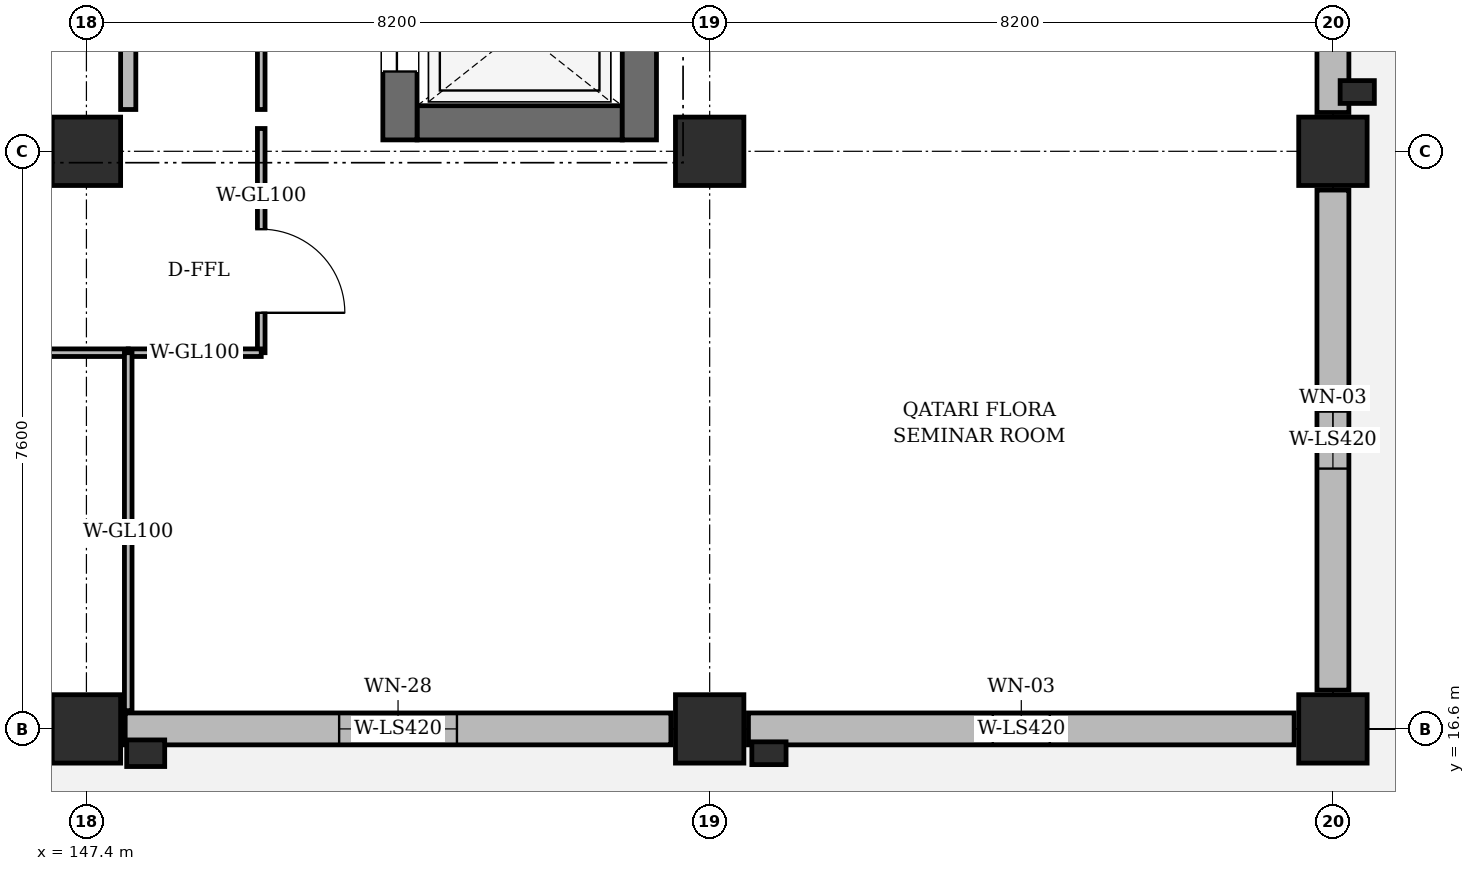
"""IFC4 building model, lengths in metres.
Left out: names, types, materials, properties, quantities, classifications, styles, units other than length and angle.
Written with IfcOpenShell. Run it as: python <this file> out.ifc"""

import sys

from ifc_helpers import new_model, si_unit, direction, frame, frame_2d, origin, origin_2d, place, context, subcontext, project, spatial, rectangle, extrude, element, fill, save


model = new_model("IFC4")
c1 = context("Model", 3, precision=1e-05, world=origin(), true_north=direction((0.0, 1.0)))
c2 = subcontext(c1, "Body", "Model", "MODEL_VIEW")
j1 = project(units=[si_unit("LENGTHUNIT", "METRE"), si_unit("PLANEANGLEUNIT", "RADIAN")], contexts=[c1])
p1 = place(None, origin())
s1 = spatial("IfcSite", under=j1, at=p1, CompositionType="ELEMENT")
p2 = place(p1, origin())
s2 = spatial("IfcBuilding", under=s1, at=p2, CompositionType="ELEMENT")
p3 = place(p2, frame((0.0, 0.0, 5.4)))
s3 = spatial("IfcBuildingStorey", under=s2, at=p3, CompositionType="ELEMENT", Elevation=5.4)
p4 = place(p3, frame((147.4, 16.6, 0.0), z_axis=(0.0, 0.0, 1.0), x_axis=(1.0, 0.0, 0.0)))
e1 = element("IfcColumn", 1, at=p4, inside=s3, PredefinedType="COLUMN", context=c2, shape_type="SweptSolid", body=[
    extrude(rectangle(XDim=0.9, YDim=0.9, at=origin_2d()), origin(), (0.0, 0.0, 1.0), 4.545),
])
p5 = place(p3, frame((147.4, 24.2, 0.0), z_axis=(0.0, 0.0, 1.0), x_axis=(1.0, 0.0, 0.0)))
e2 = element("IfcColumn", 2, at=p5, inside=s3, PredefinedType="COLUMN", context=c2, shape_type="SweptSolid", body=[
    extrude(rectangle(XDim=0.9, YDim=0.9, at=origin_2d()), origin(), (0.0, 0.0, 1.0), 4.52),
])
p6 = place(p3, frame((155.6, 16.6, 0.0), z_axis=(0.0, 0.0, 1.0), x_axis=(1.0, 0.0, 0.0)))
e3 = element("IfcColumn", 3, at=p6, inside=s3, PredefinedType="COLUMN", context=c2, shape_type="SweptSolid", body=[
    extrude(rectangle(XDim=0.9, YDim=0.9, at=origin_2d()), origin(), (0.0, 0.0, 1.0), 4.545),
])
p7 = place(p3, frame((155.6, 24.2, 0.0), z_axis=(0.0, 0.0, 1.0), x_axis=(1.0, 0.0, 0.0)))
e4 = element("IfcColumn", 4, at=p7, inside=s3, PredefinedType="COLUMN", context=c2, shape_type="SweptSolid", body=[
    extrude(rectangle(XDim=0.9, YDim=0.9, at=origin_2d()), origin(), (0.0, 0.0, 1.0), 4.52),
])
for number, where, z_axis, x_axis in (
    (5, (163.8, 16.6, 0.0), (0.0, 0.0, 1.0), (1.0, 0.0, 0.0)),
    (6, (163.8, 24.2, 0.0), (0.0, 0.0, 1.0), (1.0, 0.0, 0.0)),
):
    element("IfcColumn", number, at=place(p3, frame(where, z_axis=z_axis, x_axis=x_axis)), inside=s3, PredefinedType="COLUMN", context=c2, shape_type="SweptSolid", body=[
        extrude(rectangle(XDim=0.9, YDim=0.9, at=origin_2d()), origin(), (0.0, 0.0, 1.0), 4.545),
    ])
p8 = place(p3, frame((148.18, 16.28, 0.0), z_axis=(0.0, 0.0, 1.0), x_axis=(1.0, 0.0, 0.0)))
e7 = element("IfcColumn", 7, at=p8, inside=s3, PredefinedType="PILASTER", context=c2, shape_type="SweptSolid", body=[
    extrude(rectangle(XDim=0.5, YDim=0.35, at=origin_2d()), origin(), (0.0, 0.0, 1.0), 4.42),
])
for number, where, z_axis, x_axis in (
    (8, (156.38, 16.28, 0.0), (0.0, 0.0, 1.0), (1.0, 0.0, 0.0)),
    (9, (164.12, 24.98, 0.0), (0.0, 0.0, 1.0), (1.0, 0.0, 0.0)),
):
    element("IfcColumn", number, at=place(p3, frame(where, z_axis=z_axis, x_axis=x_axis)), inside=s3, PredefinedType="PILASTER", context=c2, shape_type="SweptSolid", body=[
        extrude(rectangle(XDim=0.45, YDim=0.3, at=origin_2d()), origin(), (0.0, 0.0, 1.0), 4.42),
    ])
p9 = place(p3, frame((147.91, 16.6, 0.0), z_axis=(0.0, 0.0, 1.0), x_axis=(1.0, 0.0, 0.0)))
e10 = element("IfcWall", 10, at=p9, inside=s3, PredefinedType="SOLIDWALL", context=c2, shape_type="SweptSolid", body=[
    extrude(rectangle(XDim=7.18, YDim=0.42, at=frame_2d((3.59, 0.0))), origin(), (0.0, 0.0, 1.0), 3.93),
])
p10 = place(p9, frame((2.815, 0.0, 0.95)))
e11 = element("IfcOpeningElement", 11, at=p10, cuts=e10, PredefinedType="OPENING", context=c2, shape_type="SweptSolid", body=[
    extrude(rectangle(XDim=1.55, YDim=2.05, at=frame_2d((0.775, 1.025))), frame((0.0, 0.222, 0.0), z_axis=(0.0, -1.0, 0.0), x_axis=(1.0, 0.0, 0.0)), (0.0, 0.0, 1.0), 0.444),
])
p11 = place(p3, frame((156.11, 16.6, 0.0), z_axis=(0.0, 0.0, 1.0), x_axis=(1.0, 0.0, 0.0)))
e12 = element("IfcWall", 12, at=p11, inside=s3, PredefinedType="SOLIDWALL", context=c2, shape_type="SweptSolid", body=[
    extrude(rectangle(XDim=7.18, YDim=0.42, at=frame_2d((3.59, 0.0))), origin(), (0.0, 0.0, 1.0), 3.93),
])
p12 = place(p11, frame((3.215, 0.0, 0.95)))
e13 = element("IfcOpeningElement", 13, at=p12, cuts=e12, PredefinedType="OPENING", context=c2, shape_type="SweptSolid", body=[
    extrude(rectangle(XDim=0.75, YDim=1.8, at=frame_2d((0.375, 0.9))), frame((0.0, 0.222, 0.0), z_axis=(0.0, -1.0, 0.0), x_axis=(1.0, 0.0, 0.0)), (0.0, 0.0, 1.0), 0.444),
])
p13 = place(p3, frame((163.8, 17.11, 0.0), z_axis=(0.0, 0.0, 1.0), x_axis=(0.0, 1.0, 0.0)))
e14 = element("IfcWall", 14, at=p13, inside=s3, PredefinedType="SOLIDWALL", context=c2, shape_type="SweptSolid", body=[
    extrude(rectangle(XDim=6.58, YDim=0.42, at=frame_2d((3.29, 0.0))), origin(), (0.0, 0.0, 1.0), 3.93),
])
p14 = place(p13, frame((2.915, 0.0, 0.95)))
e15 = element("IfcOpeningElement", 15, at=p14, cuts=e14, PredefinedType="OPENING", context=c2, shape_type="SweptSolid", body=[
    extrude(rectangle(XDim=0.75, YDim=1.8, at=frame_2d((0.375, 0.9))), frame((0.0, 0.222, 0.0), z_axis=(0.0, -1.0, 0.0), x_axis=(1.0, 0.0, 0.0)), (0.0, 0.0, 1.0), 0.444),
])
p15 = place(p3, frame((163.8, 24.71, 0.0), z_axis=(0.0, 0.0, 1.0), x_axis=(0.0, 1.0, 0.0)))
e16 = element("IfcWall", 16, at=p15, inside=s3, PredefinedType="SOLIDWALL", context=c2, shape_type="SweptSolid", body=[
    extrude(rectangle(XDim=6.58, YDim=0.42, at=frame_2d((3.29, 0.0))), origin(), (0.0, 0.0, 1.0), 3.93),
])
p16 = place(p15, frame((2.815, 0.0, 0.95)))
e17 = element("IfcOpeningElement", 17, at=p16, cuts=e16, PredefinedType="OPENING", context=c2, shape_type="SweptSolid", body=[
    extrude(rectangle(XDim=0.95, YDim=1.5, at=frame_2d((0.475, 0.75))), frame((0.0, 0.222, 0.0), z_axis=(0.0, -1.0, 0.0), x_axis=(1.0, 0.0, 0.0)), (0.0, 0.0, 1.0), 0.444),
])
p17 = place(p3, frame((151.75, 24.575, 0.0), z_axis=(0.0, 0.0, 1.0), x_axis=(1.0, 0.0, 0.0)))
e18 = element("IfcWall", 18, at=p17, inside=s3, PredefinedType="SHEAR", context=c2, shape_type="SweptSolid", body=[
    extrude(rectangle(XDim=2.7, YDim=0.45, at=frame_2d((1.35, 0.0))), origin(), (0.0, 0.0, 1.0), 4.52),
])
p18 = place(p3, frame((151.525, 24.35, 0.0), z_axis=(0.0, 0.0, 1.0), x_axis=(0.0, 1.0, 0.0)))
e19 = element("IfcWall", 19, at=p18, inside=s3, PredefinedType="SHEAR", context=c2, shape_type="SweptSolid", body=[
    extrude(rectangle(XDim=2.9, YDim=0.45, at=frame_2d((1.45, 0.0))), origin(), (0.0, 0.0, 1.0), 4.52),
])
p19 = place(p18, frame((0.9, 0.0, 0.0)))
e20 = element("IfcOpeningElement", 20, at=p19, cuts=e19, PredefinedType="OPENING", context=c2, shape_type="SweptSolid", body=[
    extrude(rectangle(XDim=1.1, YDim=2.2, at=frame_2d((0.55, 1.1))), frame((0.0, 0.237, 0.0), z_axis=(0.0, -1.0, 0.0), x_axis=(1.0, 0.0, 0.0)), (0.0, 0.0, 1.0), 0.474),
])
p20 = place(p3, frame((154.675, 24.35, 0.0), z_axis=(0.0, 0.0, 1.0), x_axis=(0.0, 1.0, 0.0)))
e21 = element("IfcWall", 21, at=p20, inside=s3, PredefinedType="SHEAR", context=c2, shape_type="SweptSolid", body=[
    extrude(rectangle(XDim=2.9, YDim=0.45, at=frame_2d((1.45, 0.0))), origin(), (0.0, 0.0, 1.0), 4.52),
])
p21 = place(p3, frame((147.95, 31.75, 0.0), z_axis=(0.0, 0.0, 1.0), x_axis=(0.0, -1.0, 0.0)))
e22 = element("IfcWall", 22, at=p21, inside=s3, PredefinedType="PARTITIONING", context=c2, shape_type="SweptSolid", body=[
    extrude(rectangle(XDim=7.0, YDim=0.2, at=frame_2d((3.5, 0.0))), origin(), (0.0, 0.0, 1.0), 4.405),
])
p22 = place(p21, frame((2.75, 0.0, 0.0)))
e23 = element("IfcOpeningElement", 23, at=p22, cuts=e22, PredefinedType="OPENING", context=c2, shape_type="SweptSolid", body=[
    extrude(rectangle(XDim=1.5, YDim=2.2, at=frame_2d((0.75, 1.1))), frame((0.0, 0.112, 0.0), z_axis=(0.0, -1.0, 0.0), x_axis=(1.0, 0.0, 0.0)), (0.0, 0.0, 1.0), 0.224),
])
p23 = place(p3, frame((149.7, 24.75, 0.0), z_axis=(0.0, 0.0, 1.0), x_axis=(0.0, 1.0, 0.0)))
e24 = element("IfcWall", 24, at=p23, inside=s3, PredefinedType="PARTITIONING", context=c2, shape_type="SweptSolid", body=[
    extrude(rectangle(XDim=11.3, YDim=0.1, at=frame_2d((5.65, 0.0))), origin(), (0.0, 0.0, 1.0), 4.405),
])
p24 = place(p23, frame((4.75, 0.0, 0.0)))
e25 = element("IfcOpeningElement", 25, at=p24, cuts=e24, PredefinedType="OPENING", context=c2, shape_type="SweptSolid", body=[
    extrude(rectangle(XDim=1.8, YDim=2.4, at=frame_2d((0.9, 1.2))), frame((0.0, 0.062, 0.0), z_axis=(0.0, -1.0, 0.0), x_axis=(1.0, 0.0, 0.0)), (0.0, 0.0, 1.0), 0.124),
])
p25 = place(p3, frame((147.95, 21.55, 0.0), z_axis=(0.0, 0.0, 1.0), x_axis=(-1.0, 0.0, 0.0)))
e26 = element("IfcWall", 26, at=p25, inside=s3, PredefinedType="PARTITIONING", context=c2, shape_type="SweptSolid", body=[
    extrude(rectangle(XDim=49.35, YDim=0.1, at=frame_2d((24.675, 0.0))), origin(), (0.0, 0.0, 1.0), 3.945),
])
p26 = place(p25, frame((23.775, 0.0, 0.0)))
e27 = element("IfcOpeningElement", 27, at=p26, cuts=e26, PredefinedType="OPENING", context=c2, shape_type="SweptSolid", body=[
    extrude(rectangle(XDim=1.8, YDim=2.4, at=frame_2d((0.9, 1.2))), frame((0.0, 0.062, 0.0), z_axis=(0.0, -1.0, 0.0), x_axis=(1.0, 0.0, 0.0)), (0.0, 0.0, 1.0), 0.124),
])
p27 = place(p3, frame((149.7, 24.5, 0.0), z_axis=(0.0, 0.0, 1.0), x_axis=(0.0, -1.0, 0.0)))
e28 = element("IfcWall", 28, at=p27, inside=s3, PredefinedType="PARTITIONING", context=c2, shape_type="SweptSolid", body=[
    extrude(rectangle(XDim=0.8, YDim=0.1, at=frame_2d((0.4, 0.0))), origin(), (0.0, 0.0, 1.0), 4.405),
])
p28 = place(p3, frame((149.7, 23.7, 0.0), z_axis=(0.0, 0.0, 1.0), x_axis=(0.0, -1.0, 0.0)))
e29 = element("IfcWall", 29, at=p28, inside=s3, PredefinedType="PARTITIONING", context=c2, shape_type="SweptSolid", body=[
    extrude(rectangle(XDim=2.15, YDim=0.1, at=frame_2d((1.075, 0.0))), origin(), (0.0, 0.0, 1.0), 4.405),
])
p29 = place(p28, frame((0.525, 0.0, 0.0)))
e30 = element("IfcOpeningElement", 30, at=p29, cuts=e29, PredefinedType="OPENING", context=c2, shape_type="SweptSolid", body=[
    extrude(rectangle(XDim=1.1, YDim=2.2, at=frame_2d((0.55, 1.1))), frame((0.0, 0.062, 0.0), z_axis=(0.0, -1.0, 0.0), x_axis=(1.0, 0.0, 0.0)), (0.0, 0.0, 1.0), 0.124),
])
p30 = place(p3, frame((149.7, 21.55, 0.0), z_axis=(0.0, 0.0, 1.0), x_axis=(-1.0, 0.0, 0.0)))
e31 = element("IfcWall", 31, at=p30, inside=s3, PredefinedType="PARTITIONING", context=c2, shape_type="SweptSolid", body=[
    extrude(rectangle(XDim=1.75, YDim=0.1, at=frame_2d((0.875, 0.0))), origin(), (0.0, 0.0, 1.0), 4.095),
])
p31 = place(p3, frame((147.95, 21.55, 0.0), z_axis=(0.0, 0.0, 1.0), x_axis=(0.0, -1.0, 0.0)))
e32 = element("IfcWall", 32, at=p31, inside=s3, PredefinedType="PARTITIONING", context=c2, shape_type="SweptSolid", body=[
    extrude(rectangle(XDim=4.71, YDim=0.1, at=frame_2d((2.355, 0.0))), origin(), (0.0, 0.0, 1.0), 4.405),
])
p32 = place(p10, origin())
e33 = element("IfcWindow", 33, at=p32, inside=s3, PartitioningType="DOUBLE_PANEL_VERTICAL", PredefinedType="WINDOW", context=c2, shape_type="SweptSolid", body=[
    extrude(rectangle(XDim=1.55, YDim=2.05, at=frame_2d((0.775, 1.025))), frame((0.0, 0.03, 0.0), z_axis=(0.0, -1.0, 0.0), x_axis=(1.0, 0.0, 0.0)), (0.0, 0.0, 1.0), 0.06),
])
fill(e11, e33)
p33 = place(p12, origin())
e34 = element("IfcWindow", 34, at=p33, inside=s3, PartitioningType="SINGLE_PANEL", PredefinedType="WINDOW", context=c2, shape_type="SweptSolid", body=[
    extrude(rectangle(XDim=0.75, YDim=1.8, at=frame_2d((0.375, 0.9))), frame((0.0, 0.03, 0.0), z_axis=(0.0, -1.0, 0.0), x_axis=(1.0, 0.0, 0.0)), (0.0, 0.0, 1.0), 0.06),
])
fill(e13, e34)
p34 = place(p14, origin())
e35 = element("IfcWindow", 35, at=p34, inside=s3, PartitioningType="SINGLE_PANEL", PredefinedType="WINDOW", context=c2, shape_type="SweptSolid", body=[
    extrude(rectangle(XDim=0.75, YDim=1.8, at=frame_2d((0.375, 0.9))), frame((0.0, 0.03, 0.0), z_axis=(0.0, -1.0, 0.0), x_axis=(1.0, 0.0, 0.0)), (0.0, 0.0, 1.0), 0.06),
])
fill(e15, e35)
p35 = place(p19, origin())
e36 = element("IfcDoor", 36, at=p35, inside=s3, OperationType="DOUBLE_DOOR_SLIDING", PredefinedType="DOOR", context=c2, shape_type="SweptSolid", body=[
    extrude(rectangle(XDim=1.1, YDim=2.2, at=frame_2d((0.55, 1.1))), frame((0.0, 0.025, 0.0), z_axis=(0.0, -1.0, 0.0), x_axis=(1.0, 0.0, 0.0)), (0.0, 0.0, 1.0), 0.05),
])
fill(e20, e36)
p36 = place(p29, origin())
e37 = element("IfcDoor", 37, at=p36, inside=s3, OperationType="SINGLE_SWING_RIGHT", PredefinedType="DOOR", context=c2, shape_type="SweptSolid", body=[
    extrude(rectangle(XDim=1.1, YDim=2.2, at=frame_2d((0.55, 1.1))), frame((0.0, 0.025, 0.0), z_axis=(0.0, -1.0, 0.0), x_axis=(1.0, 0.0, 0.0)), (0.0, 0.0, 1.0), 0.05),
])
fill(e30, e37)
save(model, sys.argv[1])
